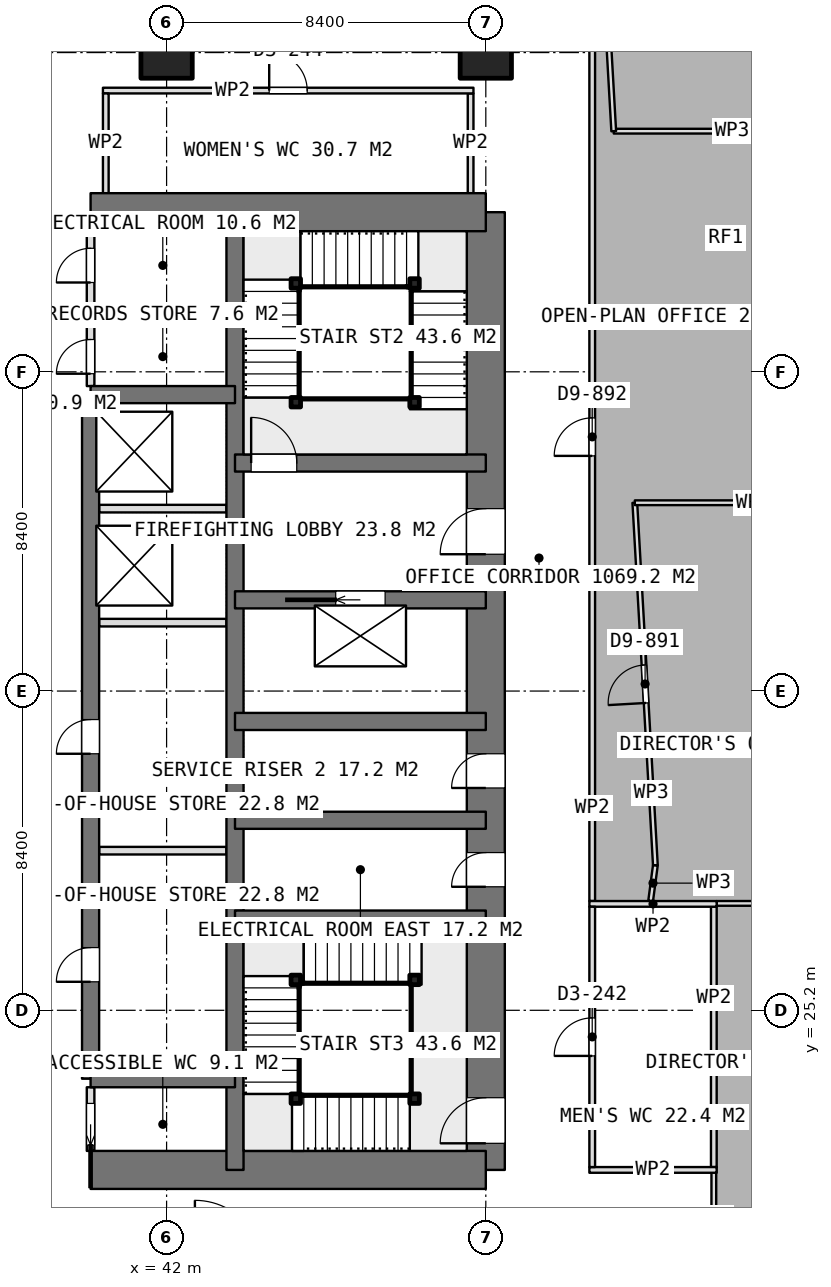
"""IFC4 building model, lengths in metres.
Left out: names, types, materials, properties, quantities, classifications, styles, units other than length and angle.
Written with IfcOpenShell. Run it as: python <this file> out.ifc"""

import sys

from ifc_helpers import new_model, si_unit, direction, frame, frame_2d, origin, origin_2d, place, context, subcontext, project, spatial, rectangle, extrude, element, fill, save


model = new_model("IFC4")
c1 = context("Model", 3, precision=1e-05, world=origin(), true_north=direction((0.0, 1.0)))
c2 = subcontext(c1, "Body", "Model", "MODEL_VIEW")
j1 = project(units=[si_unit("LENGTHUNIT", "METRE"), si_unit("PLANEANGLEUNIT", "RADIAN")], contexts=[c1])
p1 = place(None, origin())
s1 = spatial("IfcSite", under=j1, at=p1, CompositionType="ELEMENT")
p2 = place(p1, origin())
s2 = spatial("IfcBuilding", under=s1, at=p2, CompositionType="ELEMENT")
p3 = place(p2, frame((0.0, 0.0, 225.2)))
s3 = spatial("IfcBuildingStorey", under=s2, at=p3, CompositionType="ELEMENT", Elevation=225.2)
for number, where, z_axis, x_axis in (
    (1, (40.0, 21.0, 0.0), (0.0, 0.0, 1.0), (1.0, 0.0, 0.0)),
    (2, (40.0, 46.2, 0.0), (0.0, 0.0, 1.0), (1.0, 0.0, 0.0)),
):
    element("IfcWall", number, at=place(p3, frame(where, z_axis=z_axis, x_axis=x_axis)), inside=s3, PredefinedType="SHEAR", context=c2, shape_type="SweptSolid", body=[
        extrude(rectangle(XDim=10.4, YDim=1.0, at=frame_2d((5.2, 0.0))), origin(), (0.0, 0.0, 1.0), 3.75),
    ])
p4 = place(p3, frame((50.4, 21.0, 0.0), z_axis=(0.0, 0.0, 1.0), x_axis=(0.0, 1.0, 0.0)))
e3 = element("IfcWall", 3, at=p4, inside=s3, PredefinedType="SHEAR", context=c2, shape_type="SweptSolid", body=[
    extrude(rectangle(XDim=25.2, YDim=1.0, at=frame_2d((12.6, 0.0))), origin(), (0.0, 0.0, 1.0), 3.75),
])
p5 = place(p4, frame((16.2, 0.0, 0.0)))
e4 = element("IfcOpeningElement", 4, at=p5, cuts=e3, PredefinedType="OPENING", context=c2, shape_type="SweptSolid", body=[
    extrude(rectangle(XDim=1.2, YDim=2.1, at=frame_2d((0.6, 1.05))), frame((0.0, 0.51, 0.0), z_axis=(0.0, -1.0, 0.0), x_axis=(1.0, 0.0, 0.0)), (0.0, 0.0, 1.0), 1.02),
])
p6 = place(p4, frame((10.05, 0.0, 0.0)))
e5 = element("IfcOpeningElement", 5, at=p6, cuts=e3, PredefinedType="OPENING", context=c2, shape_type="SweptSolid", body=[
    extrude(rectangle(XDim=0.9, YDim=2.1, at=frame_2d((0.45, 1.05))), frame((0.0, 0.51, 0.0), z_axis=(0.0, -1.0, 0.0), x_axis=(1.0, 0.0, 0.0)), (0.0, 0.0, 1.0), 1.02),
])
p7 = place(p4, frame((7.45, 0.0, 0.0)))
e6 = element("IfcOpeningElement", 6, at=p7, cuts=e3, PredefinedType="OPENING", context=c2, shape_type="SweptSolid", body=[
    extrude(rectangle(XDim=0.9, YDim=2.1, at=frame_2d((0.45, 1.05))), frame((0.0, 0.51, 0.0), z_axis=(0.0, -1.0, 0.0), x_axis=(1.0, 0.0, 0.0)), (0.0, 0.0, 1.0), 1.02),
])
p8 = place(p4, frame((0.7, 0.0, 0.0)))
e7 = element("IfcOpeningElement", 7, at=p8, cuts=e3, PredefinedType="OPENING", context=c2, shape_type="SweptSolid", body=[
    extrude(rectangle(XDim=1.2, YDim=2.1, at=frame_2d((0.6, 1.05))), frame((0.0, 0.51, 0.0), z_axis=(0.0, -1.0, 0.0), x_axis=(1.0, 0.0, 0.0)), (0.0, 0.0, 1.0), 1.02),
])
p9 = place(p3, frame((43.8, 21.0, 0.0), z_axis=(0.0, 0.0, 1.0), x_axis=(0.0, 1.0, 0.0)))
e8 = element("IfcWall", 8, at=p9, inside=s3, PredefinedType="SHEAR", context=c2, shape_type="SweptSolid", body=[
    extrude(rectangle(XDim=25.2, YDim=0.45, at=frame_2d((12.6, 0.0))), origin(), (0.0, 0.0, 1.0), 3.75),
])
p10 = place(p3, frame((40.0, 23.4, 0.0), z_axis=(0.0, 0.0, 1.0), x_axis=(0.0, 1.0, 0.0)))
e9 = element("IfcWall", 9, at=p10, inside=s3, PredefinedType="SHEAR", context=c2, shape_type="SweptSolid", body=[
    extrude(rectangle(XDim=18.0, YDim=0.45, at=frame_2d((9.0, 0.0))), origin(), (0.0, 0.0, 1.0), 3.75),
])
p11 = place(p10, frame((2.55, 0.0, 0.0)))
e10 = element("IfcOpeningElement", 10, at=p11, cuts=e9, PredefinedType="OPENING", context=c2, shape_type="SweptSolid", body=[
    extrude(rectangle(XDim=0.9, YDim=2.1, at=frame_2d((0.45, 1.05))), frame((0.0, 0.235, 0.0), z_axis=(0.0, -1.0, 0.0), x_axis=(1.0, 0.0, 0.0)), (0.0, 0.0, 1.0), 0.47),
])
p12 = place(p10, frame((8.55, 0.0, 0.0)))
e11 = element("IfcOpeningElement", 11, at=p12, cuts=e9, PredefinedType="OPENING", context=c2, shape_type="SweptSolid", body=[
    extrude(rectangle(XDim=0.9, YDim=2.1, at=frame_2d((0.45, 1.05))), frame((0.0, 0.235, 0.0), z_axis=(0.0, -1.0, 0.0), x_axis=(1.0, 0.0, 0.0)), (0.0, 0.0, 1.0), 0.47),
])
for number, where, z_axis, x_axis in (
    (12, (40.0, 23.4, 0.0), (0.0, 0.0, 1.0), (1.0, 0.0, 0.0)),
    (13, (40.0, 41.4, 0.0), (0.0, 0.0, 1.0), (1.0, 0.0, 0.0)),
):
    element("IfcWall", number, at=place(p3, frame(where, z_axis=z_axis, x_axis=x_axis)), inside=s3, PredefinedType="SHEAR", context=c2, shape_type="SweptSolid", body=[
        extrude(rectangle(XDim=3.8, YDim=0.45, at=frame_2d((1.9, 0.0))), origin(), (0.0, 0.0, 1.0), 3.75),
    ])
for number, where, z_axis, x_axis in (
    (14, (43.8, 27.6, 0.0), (0.0, 0.0, 1.0), (1.0, 0.0, 0.0)),
    (15, (43.8, 30.2, 0.0), (0.0, 0.0, 1.0), (1.0, 0.0, 0.0)),
    (16, (43.8, 32.8, 0.0), (0.0, 0.0, 1.0), (1.0, 0.0, 0.0)),
):
    element("IfcWall", number, at=place(p3, frame(where, z_axis=z_axis, x_axis=x_axis)), inside=s3, PredefinedType="SHEAR", context=c2, shape_type="SweptSolid", body=[
        extrude(rectangle(XDim=6.6, YDim=0.45, at=frame_2d((3.3, 0.0))), origin(), (0.0, 0.0, 1.0), 3.75),
    ])
p13 = place(p3, frame((43.8, 36.0, 0.0), z_axis=(0.0, 0.0, 1.0), x_axis=(1.0, 0.0, 0.0)))
e17 = element("IfcWall", 17, at=p13, inside=s3, PredefinedType="SHEAR", context=c2, shape_type="SweptSolid", body=[
    extrude(rectangle(XDim=6.6, YDim=0.45, at=frame_2d((3.3, 0.0))), origin(), (0.0, 0.0, 1.0), 3.75),
])
p14 = place(p13, frame((2.65, 0.0, 0.0)))
e18 = element("IfcOpeningElement", 18, at=p14, cuts=e17, PredefinedType="OPENING", context=c2, shape_type="SweptSolid", body=[
    extrude(rectangle(XDim=1.3, YDim=2.1, at=frame_2d((0.65, 1.05))), frame((0.0, 0.235, 0.0), z_axis=(0.0, -1.0, 0.0), x_axis=(1.0, 0.0, 0.0)), (0.0, 0.0, 1.0), 0.47),
])
p15 = place(p3, frame((43.8, 39.6, 0.0), z_axis=(0.0, 0.0, 1.0), x_axis=(1.0, 0.0, 0.0)))
e19 = element("IfcWall", 19, at=p15, inside=s3, PredefinedType="SHEAR", context=c2, shape_type="SweptSolid", body=[
    extrude(rectangle(XDim=6.6, YDim=0.45, at=frame_2d((3.3, 0.0))), origin(), (0.0, 0.0, 1.0), 3.75),
])
p16 = place(p15, frame((0.425, 0.0, 0.0)))
e20 = element("IfcOpeningElement", 20, at=p16, cuts=e19, PredefinedType="OPENING", context=c2, shape_type="SweptSolid", body=[
    extrude(rectangle(XDim=1.2, YDim=2.1, at=frame_2d((0.6, 1.05))), frame((0.0, 0.235, 0.0), z_axis=(0.0, -1.0, 0.0), x_axis=(1.0, 0.0, 0.0)), (0.0, 0.0, 1.0), 0.47),
])
for number, where, z_axis, x_axis in (
    (21, (42.0, 50.4, 0.0), (0.0, 0.0, 1.0), (1.0, 0.0, 0.0)),
    (22, (50.4, 50.4, 0.0), (0.0, 0.0, 1.0), (1.0, 0.0, 0.0)),
):
    element("IfcColumn", number, at=place(p3, frame(where, z_axis=z_axis, x_axis=x_axis)), inside=s3, PredefinedType="COLUMN", context=c2, shape_type="SweptSolid", body=[
        extrude(rectangle(XDim=1.35, YDim=1.35, at=origin_2d()), origin(), (0.0, 0.0, 1.0), 3.75),
    ])
for number, where, z_axis, x_axis in (
    (23, (40.225, 29.4, 0.0), (0.0, 0.0, 1.0), (1.0, 0.0, 0.0)),
    (24, (40.225, 35.4, 0.0), (0.0, 0.0, 1.0), (1.0, 0.0, 0.0)),
    (25, (40.225, 38.4, 0.0), (0.0, 0.0, 1.0), (1.0, 0.0, 0.0)),
):
    element("IfcWall", number, at=place(p3, frame(where, z_axis=z_axis, x_axis=x_axis)), inside=s3, PredefinedType="PARTITIONING", context=c2, shape_type="SweptSolid", body=[
        extrude(rectangle(XDim=3.35, YDim=0.2, at=frame_2d((1.675, 0.0))), origin(), (0.0, 0.0, 1.0), 3.5),
    ])
p17 = place(p3, frame((40.0, 21.5, 0.0), z_axis=(0.0, 0.0, 1.0), x_axis=(0.0, 1.0, 0.0)))
e26 = element("IfcWall", 26, at=p17, inside=s3, PredefinedType="PARTITIONING", context=c2, shape_type="SweptSolid", body=[
    extrude(rectangle(XDim=1.675, YDim=0.2, at=frame_2d((0.837, 0.0))), origin(), (0.0, 0.0, 1.0), 3.5),
])
p18 = place(p17, frame((0.15, 0.0, 0.0)))
e27 = element("IfcOpeningElement", 27, at=p18, cuts=e26, PredefinedType="OPENING", context=c2, shape_type="SweptSolid", body=[
    extrude(rectangle(XDim=1.1, YDim=2.1, at=frame_2d((0.55, 1.05))), frame((0.0, 0.11, 0.0), z_axis=(0.0, -1.0, 0.0), x_axis=(1.0, 0.0, 0.0)), (0.0, 0.0, 1.0), 0.22),
])
p19 = place(p3, frame((40.0, 41.625, 0.0), z_axis=(0.0, 0.0, 1.0), x_axis=(0.0, 1.0, 0.0)))
e28 = element("IfcWall", 28, at=p19, inside=s3, PredefinedType="PARTITIONING", context=c2, shape_type="SweptSolid", body=[
    extrude(rectangle(XDim=4.075, YDim=0.2, at=frame_2d((2.038, 0.0))), origin(), (0.0, 0.0, 1.0), 3.5),
])
p20 = place(p19, frame((2.725, 0.0, 0.0)))
e29 = element("IfcOpeningElement", 29, at=p20, cuts=e28, PredefinedType="OPENING", context=c2, shape_type="SweptSolid", body=[
    extrude(rectangle(XDim=0.9, YDim=2.1, at=frame_2d((0.45, 1.05))), frame((0.0, 0.11, 0.0), z_axis=(0.0, -1.0, 0.0), x_axis=(1.0, 0.0, 0.0)), (0.0, 0.0, 1.0), 0.22),
])
p21 = place(p19, frame((0.325, 0.0, 0.0)))
e30 = element("IfcOpeningElement", 30, at=p21, cuts=e28, PredefinedType="OPENING", context=c2, shape_type="SweptSolid", body=[
    extrude(rectangle(XDim=0.9, YDim=2.1, at=frame_2d((0.45, 1.05))), frame((0.0, 0.11, 0.0), z_axis=(0.0, -1.0, 0.0), x_axis=(1.0, 0.0, 0.0)), (0.0, 0.0, 1.0), 0.22),
])
p22 = place(p3, frame((40.0, 43.4, 0.0), z_axis=(0.0, 0.0, 1.0), x_axis=(1.0, 0.0, 0.0)))
e31 = element("IfcWall", 31, at=p22, inside=s3, PredefinedType="PARTITIONING", context=c2, shape_type="SweptSolid", body=[
    extrude(rectangle(XDim=3.575, YDim=0.2, at=frame_2d((1.788, 0.0))), origin(), (0.0, 0.0, 1.0), 3.5),
])
p23 = place(p3, frame((40.325, 49.4, 0.0), z_axis=(0.0, 0.0, 1.0), x_axis=(1.0, 0.0, 0.0)))
e32 = element("IfcWall", 32, at=p23, inside=s3, PredefinedType="PARTITIONING", context=c2, shape_type="SweptSolid", body=[
    extrude(rectangle(XDim=9.75, YDim=0.15, at=frame_2d((4.875, 0.0))), origin(), (0.0, 0.0, 1.0), 3.5),
])
p24 = place(p23, frame((4.375, 0.0, 0.0)))
e33 = element("IfcOpeningElement", 33, at=p24, cuts=e32, PredefinedType="OPENING", context=c2, shape_type="SweptSolid", body=[
    extrude(rectangle(XDim=1.0, YDim=2.1, at=frame_2d((0.5, 1.05))), frame((0.0, 0.085, 0.0), z_axis=(0.0, -1.0, 0.0), x_axis=(1.0, 0.0, 0.0)), (0.0, 0.0, 1.0), 0.17),
])
for number, where, z_axis, x_axis in (
    (34, (40.4, 46.7, 0.0), (0.0, 0.0, 1.0), (0.0, 1.0, 0.0)),
    (35, (50.0, 46.7, 0.0), (0.0, 0.0, 1.0), (0.0, 1.0, 0.0)),
):
    element("IfcWall", number, at=place(p3, frame(where, z_axis=z_axis, x_axis=x_axis)), inside=s3, PredefinedType="PARTITIONING", context=c2, shape_type="SweptSolid", body=[
        extrude(rectangle(XDim=2.625, YDim=0.15, at=frame_2d((1.312, 0.0))), origin(), (0.0, 0.0, 1.0), 3.5),
    ])
for number, where, z_axis, x_axis in (
    (36, (53.125, 21.0, 0.0), (0.0, 0.0, 1.0), (1.0, 0.0, 0.0)),
    (37, (53.125, 28.0, 0.0), (0.0, 0.0, 1.0), (1.0, 0.0, 0.0)),
):
    element("IfcWall", number, at=place(p3, frame(where, z_axis=z_axis, x_axis=x_axis)), inside=s3, PredefinedType="PARTITIONING", context=c2, shape_type="SweptSolid", body=[
        extrude(rectangle(XDim=3.35, YDim=0.15, at=frame_2d((1.675, 0.0))), origin(), (0.0, 0.0, 1.0), 3.5),
    ])
p25 = place(p3, frame((53.2, 21.075, 0.0), z_axis=(0.0, 0.0, 1.0), x_axis=(0.0, 1.0, 0.0)))
e38 = element("IfcWall", 38, at=p25, inside=s3, PredefinedType="PARTITIONING", context=c2, shape_type="SweptSolid", body=[
    extrude(rectangle(XDim=6.85, YDim=0.15, at=frame_2d((3.425, 0.0))), origin(), (0.0, 0.0, 1.0), 3.5),
])
p26 = place(p25, frame((2.925, 0.0, 0.0)))
e39 = element("IfcOpeningElement", 39, at=p26, cuts=e38, PredefinedType="OPENING", context=c2, shape_type="SweptSolid", body=[
    extrude(rectangle(XDim=1.0, YDim=2.1, at=frame_2d((0.5, 1.05))), frame((0.0, 0.085, 0.0), z_axis=(0.0, -1.0, 0.0), x_axis=(1.0, 0.0, 0.0)), (0.0, 0.0, 1.0), 0.17),
])
p27 = place(p3, frame((56.4, 21.075, 0.0), z_axis=(0.0, 0.0, 1.0), x_axis=(0.0, 1.0, 0.0)))
e40 = element("IfcWall", 40, at=p27, inside=s3, PredefinedType="PARTITIONING", context=c2, shape_type="SweptSolid", body=[
    extrude(rectangle(XDim=6.85, YDim=0.15, at=frame_2d((3.425, 0.0))), origin(), (0.0, 0.0, 1.0), 3.5),
])
p28 = place(p3, frame((56.4, 18.4, 0.0), z_axis=(0.0, 0.0, 1.0), x_axis=(0.0, 1.0, 0.0)))
e41 = element("IfcWall", 41, at=p28, inside=s3, PredefinedType="PARTITIONING", context=c2, shape_type="SweptSolid", body=[
    extrude(rectangle(XDim=2.675, YDim=0.125, at=frame_2d((1.337, 0.0))), origin(), (0.0, 0.0, 1.0), 3.5),
])
p29 = place(p3, frame((56.476, 28.013, 0.0), z_axis=(0.0, 0.0, 1.0), x_axis=(1.0, 0.0, 0.0)))
e42 = element("IfcWall", 42, at=p29, inside=s3, PredefinedType="PARTITIONING", context=c2, shape_type="SweptSolid", body=[
    extrude(rectangle(XDim=4.528, YDim=0.125, at=frame_2d((2.264, 0.0))), origin(), (0.0, 0.0, 1.0), 3.5),
])
p30 = place(p3, frame((54.737, 28.075, 0.0), z_axis=(0.0, 0.0, 1.0), x_axis=(0.131524288557, 0.991312948326, 0.0)))
e43 = element("IfcWall", 43, at=p30, inside=s3, PredefinedType="PARTITIONING", context=c2, shape_type="SweptSolid", body=[
    extrude(rectangle(XDim=0.95, YDim=0.125, at=frame_2d((0.475, 0.0))), origin(), (0.0, 0.0, 1.0), 3.5),
])
p31 = place(p3, frame((54.862, 29.017, 0.0), z_axis=(0.0, 0.0, 1.0), x_axis=(-0.056632031714, 0.99839511867, 0.0)))
e44 = element("IfcWall", 44, at=p31, inside=s3, PredefinedType="PARTITIONING", context=c2, shape_type="SweptSolid", body=[
    extrude(rectangle(XDim=9.553, YDim=0.125, at=frame_2d((4.777, 0.0))), origin(), (0.0, 0.0, 1.0), 3.5),
])
p32 = place(p31, frame((4.277, 0.0, 0.0)))
e45 = element("IfcOpeningElement", 45, at=p32, cuts=e44, PredefinedType="OPENING", context=c2, shape_type="SweptSolid", body=[
    extrude(rectangle(XDim=1.0, YDim=2.1, at=frame_2d((0.5, 1.05))), frame((0.0, 0.073, 0.0), z_axis=(0.0, -1.0, 0.0), x_axis=(1.0, 0.0, 0.0)), (0.0, 0.0, 1.0), 0.145),
])
for number, where, z_axis, x_axis in (
    (46, (54.321, 38.555, 0.0), (0.0, 0.0, 1.0), (1.0, 0.0, 0.0)),
    (47, (59.996, 48.332, 0.0), (0.0, 0.0, 1.0), (-1.0, 0.0, 0.0)),
):
    element("IfcWall", number, at=place(p3, frame(where, z_axis=z_axis, x_axis=x_axis)), inside=s3, PredefinedType="PARTITIONING", context=c2, shape_type="SweptSolid", body=[
        extrude(rectangle(XDim=6.23, YDim=0.125, at=frame_2d((3.115, 0.0))), origin(), (0.0, 0.0, 1.0), 3.5),
    ])
p33 = place(p3, frame((53.766, 48.332, 0.0), z_axis=(0.0, 0.0, 1.0), x_axis=(-0.056691956107, 0.998391717771, 0.0)))
e48 = element("IfcWall", 48, at=p33, inside=s3, PredefinedType="PARTITIONING", context=c2, shape_type="SweptSolid", body=[
    extrude(rectangle(XDim=6.529, YDim=0.125, at=frame_2d((3.264, 0.0))), origin(), (0.0, 0.0, 1.0), 3.5),
])
p34 = place(p3, frame((53.2, 28.075, 0.0), z_axis=(0.0, 0.0, 1.0), x_axis=(0.0, 1.0, 0.0)))
e49 = element("IfcWall", 49, at=p34, inside=s3, PredefinedType="PARTITIONING", context=c2, shape_type="SweptSolid", body=[
    extrude(rectangle(XDim=24.5, YDim=0.15, at=frame_2d((12.25, 0.0))), origin(), (0.0, 0.0, 1.0), 3.5),
])
p35 = place(p34, frame((11.713, 0.0, 0.0)))
e50 = element("IfcOpeningElement", 50, at=p35, cuts=e49, PredefinedType="OPENING", context=c2, shape_type="SweptSolid", body=[
    extrude(rectangle(XDim=1.0, YDim=2.1, at=frame_2d((0.5, 1.05))), frame((0.0, 0.085, 0.0), z_axis=(0.0, -1.0, 0.0), x_axis=(1.0, 0.0, 0.0)), (0.0, 0.0, 1.0), 0.17),
])
for number, where, z_axis, x_axis in (
    (51, (45.4, 41.2, 0.0), (0.0, 0.0, 1.0), (1.0, 0.0, 0.0)),
    (52, (45.4, 44.325, 0.0), (0.0, 0.0, 1.0), (1.0, 0.0, 0.0)),
    (53, (48.525, 44.325, 0.0), (0.0, 0.0, 1.0), (1.0, 0.0, 0.0)),
    (54, (48.525, 41.2, 0.0), (0.0, 0.0, 1.0), (1.0, 0.0, 0.0)),
    (55, (48.525, 22.875, 0.0), (0.0, 0.0, 1.0), (1.0, 0.0, 0.0)),
    (56, (45.4, 22.875, 0.0), (0.0, 0.0, 1.0), (1.0, 0.0, 0.0)),
    (57, (45.4, 26.0, 0.0), (0.0, 0.0, 1.0), (1.0, 0.0, 0.0)),
    (58, (48.525, 26.0, 0.0), (0.0, 0.0, 1.0), (1.0, 0.0, 0.0)),
):
    element("IfcColumn", number, at=place(p3, frame(where, z_axis=z_axis, x_axis=x_axis)), inside=s3, PredefinedType="COLUMN", context=c2, shape_type="SweptSolid", body=[
        extrude(rectangle(XDim=0.25, YDim=0.25, at=origin_2d()), origin(), (0.0, 0.0, 1.0), 3.75),
    ])
p36 = place(p5, origin())
e59 = element("IfcDoor", 59, at=p36, inside=s3, OperationType="SINGLE_SWING_LEFT", PredefinedType="DOOR", context=c2, shape_type="SweptSolid", body=[
    extrude(rectangle(XDim=1.2, YDim=2.1, at=frame_2d((0.6, 1.05))), frame((0.0, 0.025, 0.0), z_axis=(0.0, -1.0, 0.0), x_axis=(1.0, 0.0, 0.0)), (0.0, 0.0, 1.0), 0.05),
])
fill(e4, e59)
p37 = place(p6, origin())
e60 = element("IfcDoor", 60, at=p37, inside=s3, OperationType="SINGLE_SWING_LEFT", PredefinedType="DOOR", context=c2, shape_type="SweptSolid", body=[
    extrude(rectangle(XDim=0.9, YDim=2.1, at=frame_2d((0.45, 1.05))), frame((0.0, 0.025, 0.0), z_axis=(0.0, -1.0, 0.0), x_axis=(1.0, 0.0, 0.0)), (0.0, 0.0, 1.0), 0.05),
])
fill(e5, e60)
p38 = place(p7, origin())
e61 = element("IfcDoor", 61, at=p38, inside=s3, OperationType="SINGLE_SWING_LEFT", PredefinedType="DOOR", context=c2, shape_type="SweptSolid", body=[
    extrude(rectangle(XDim=0.9, YDim=2.1, at=frame_2d((0.45, 1.05))), frame((0.0, 0.025, 0.0), z_axis=(0.0, -1.0, 0.0), x_axis=(1.0, 0.0, 0.0)), (0.0, 0.0, 1.0), 0.05),
])
fill(e6, e61)
p39 = place(p18, origin())
e62 = element("IfcDoor", 62, at=p39, inside=s3, OperationType="SLIDING_TO_LEFT", PredefinedType="DOOR", context=c2, shape_type="SweptSolid", body=[
    extrude(rectangle(XDim=1.1, YDim=2.1, at=frame_2d((0.55, 1.05))), frame((0.0, 0.025, 0.0), z_axis=(0.0, -1.0, 0.0), x_axis=(1.0, 0.0, 0.0)), (0.0, 0.0, 1.0), 0.05),
])
fill(e27, e62)
p40 = place(p20, origin())
e63 = element("IfcDoor", 63, at=p40, inside=s3, OperationType="SINGLE_SWING_LEFT", PredefinedType="DOOR", context=c2, shape_type="SweptSolid", body=[
    extrude(rectangle(XDim=0.9, YDim=2.1, at=frame_2d((0.45, 1.05))), frame((0.0, 0.025, 0.0), z_axis=(0.0, -1.0, 0.0), x_axis=(1.0, 0.0, 0.0)), (0.0, 0.0, 1.0), 0.05),
])
fill(e29, e63)
p41 = place(p21, origin())
e64 = element("IfcDoor", 64, at=p41, inside=s3, OperationType="SINGLE_SWING_LEFT", PredefinedType="DOOR", context=c2, shape_type="SweptSolid", body=[
    extrude(rectangle(XDim=0.9, YDim=2.1, at=frame_2d((0.45, 1.05))), frame((0.0, 0.025, 0.0), z_axis=(0.0, -1.0, 0.0), x_axis=(1.0, 0.0, 0.0)), (0.0, 0.0, 1.0), 0.05),
])
fill(e30, e64)
p42 = place(p11, origin())
e65 = element("IfcDoor", 65, at=p42, inside=s3, OperationType="SINGLE_SWING_LEFT", PredefinedType="DOOR", context=c2, shape_type="SweptSolid", body=[
    extrude(rectangle(XDim=0.9, YDim=2.1, at=frame_2d((0.45, 1.05))), frame((0.0, 0.025, 0.0), z_axis=(0.0, -1.0, 0.0), x_axis=(1.0, 0.0, 0.0)), (0.0, 0.0, 1.0), 0.05),
])
fill(e10, e65)
p43 = place(p12, origin())
e66 = element("IfcDoor", 66, at=p43, inside=s3, OperationType="SINGLE_SWING_LEFT", PredefinedType="DOOR", context=c2, shape_type="SweptSolid", body=[
    extrude(rectangle(XDim=0.9, YDim=2.1, at=frame_2d((0.45, 1.05))), frame((0.0, 0.025, 0.0), z_axis=(0.0, -1.0, 0.0), x_axis=(1.0, 0.0, 0.0)), (0.0, 0.0, 1.0), 0.05),
])
fill(e11, e66)
p44 = place(p14, origin())
e67 = element("IfcDoor", 67, at=p44, inside=s3, OperationType="SLIDING_TO_LEFT", PredefinedType="USERDEFINED", context=c2, shape_type="SweptSolid", body=[
    extrude(rectangle(XDim=1.3, YDim=2.1, at=frame_2d((0.65, 1.05))), frame((0.0, 0.025, 0.0), z_axis=(0.0, -1.0, 0.0), x_axis=(1.0, 0.0, 0.0)), (0.0, 0.0, 1.0), 0.05),
])
fill(e18, e67)
p45 = place(p24, origin())
e68 = element("IfcDoor", 68, at=p45, inside=s3, OperationType="SINGLE_SWING_LEFT", PredefinedType="DOOR", context=c2, shape_type="SweptSolid", body=[
    extrude(rectangle(XDim=1.0, YDim=2.1, at=frame_2d((0.5, 1.05))), frame((0.0, 0.025, 0.0), z_axis=(0.0, -1.0, 0.0), x_axis=(1.0, 0.0, 0.0)), (0.0, 0.0, 1.0), 0.05),
])
fill(e33, e68)
p46 = place(p26, origin())
e69 = element("IfcDoor", 69, at=p46, inside=s3, OperationType="SINGLE_SWING_LEFT", PredefinedType="DOOR", context=c2, shape_type="SweptSolid", body=[
    extrude(rectangle(XDim=1.0, YDim=2.1, at=frame_2d((0.5, 1.05))), frame((0.0, 0.025, 0.0), z_axis=(0.0, -1.0, 0.0), x_axis=(1.0, 0.0, 0.0)), (0.0, 0.0, 1.0), 0.05),
])
fill(e39, e69)
p47 = place(p32, origin())
e70 = element("IfcDoor", 70, at=p47, inside=s3, OperationType="SINGLE_SWING_LEFT", PredefinedType="DOOR", context=c2, shape_type="SweptSolid", body=[
    extrude(rectangle(XDim=1.0, YDim=2.1, at=frame_2d((0.5, 1.05))), frame((0.0, 0.025, 0.0), z_axis=(0.0, -1.0, 0.0), x_axis=(1.0, 0.0, 0.0)), (0.0, 0.0, 1.0), 0.05),
])
fill(e45, e70)
p48 = place(p35, origin())
e71 = element("IfcDoor", 71, at=p48, inside=s3, OperationType="SINGLE_SWING_LEFT", PredefinedType="DOOR", context=c2, shape_type="SweptSolid", body=[
    extrude(rectangle(XDim=1.0, YDim=2.1, at=frame_2d((0.5, 1.05))), frame((0.0, 0.025, 0.0), z_axis=(0.0, -1.0, 0.0), x_axis=(1.0, 0.0, 0.0)), (0.0, 0.0, 1.0), 0.05),
])
fill(e50, e71)
p49 = place(p16, origin())
e72 = element("IfcDoor", 72, at=p49, inside=s3, OperationType="SINGLE_SWING_RIGHT", PredefinedType="DOOR", context=c2, shape_type="SweptSolid", body=[
    extrude(rectangle(XDim=1.2, YDim=2.1, at=frame_2d((0.6, 1.05))), frame((0.0, 0.025, 0.0), z_axis=(0.0, -1.0, 0.0), x_axis=(1.0, 0.0, 0.0)), (0.0, 0.0, 1.0), 0.05),
])
fill(e20, e72)
p50 = place(p8, origin())
e73 = element("IfcDoor", 73, at=p50, inside=s3, OperationType="SINGLE_SWING_RIGHT", PredefinedType="DOOR", context=c2, shape_type="SweptSolid", body=[
    extrude(rectangle(XDim=1.2, YDim=2.1, at=frame_2d((0.6, 1.05))), frame((0.0, 0.025, 0.0), z_axis=(0.0, -1.0, 0.0), x_axis=(1.0, 0.0, 0.0)), (0.0, 0.0, 1.0), 0.05),
])
fill(e7, e73)
save(model, sys.argv[1])
